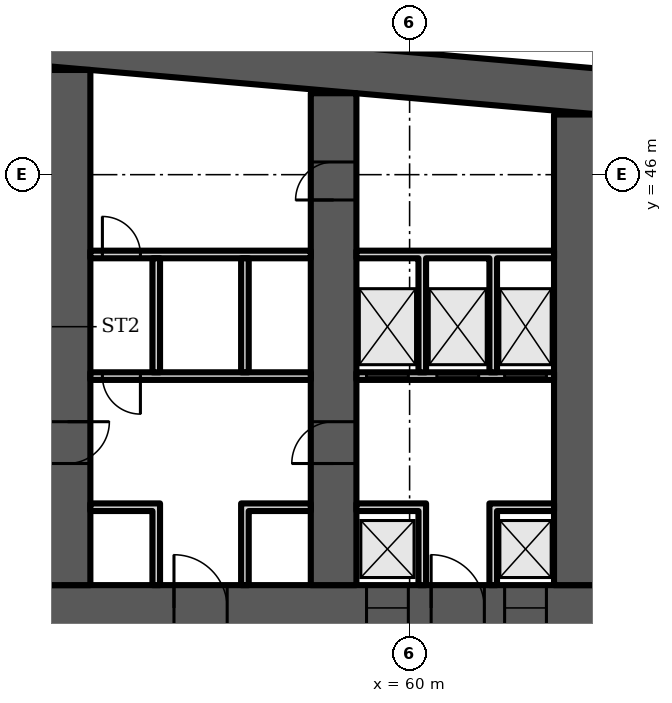
"""IFC4 building model, lengths in metres.
Left out: names, types, materials, properties, quantities, classifications, styles, units other than length and angle.
Written with IfcOpenShell. Run it as: python <this file> out.ifc"""

import sys

from ifc_helpers import new_model, si_unit, direction, frame, frame_2d, origin, place, context, subcontext, project, spatial, polyline, rectangle, outline, extrude, element, fill, save


model = new_model("IFC4")
c1 = context("Model", 3, precision=1e-05, world=origin(), true_north=direction((0.0, 1.0)))
c2 = subcontext(c1, "Body", "Model", "MODEL_VIEW")
j1 = project(units=[si_unit("LENGTHUNIT", "METRE"), si_unit("PLANEANGLEUNIT", "RADIAN")], contexts=[c1])
p1 = place(None, origin())
s1 = spatial("IfcSite", under=j1, at=p1, CompositionType="ELEMENT")
p2 = place(p1, origin())
s2 = spatial("IfcBuilding", under=s1, at=p2, CompositionType="ELEMENT")
p3 = place(p2, frame((0.0, 0.0, 84.7)))
s3 = spatial("IfcBuildingStorey", under=s2, at=p3, CompositionType="ELEMENT", Elevation=84.7)
p4 = place(p3, origin())
e1 = element("IfcWall", 1, at=p4, inside=s3, PredefinedType="SHEAR", context=c2, shape_type="SweptSolid", body=[
    extrude(outline(polyline([(9.0, 47.583), (37.0, 50.032), (65.0, 47.583), (65.0, 48.787), (37.0, 51.237), (9.0, 48.787), (9.0, 47.583)])), origin(), (0.0, 0.0, 1.0), 3.6),
])
p5 = place(p3, frame((9.0, 34.6, 0.0), z_axis=(0.0, 0.0, 1.0), x_axis=(1.0, 0.0, 0.0)))
e2 = element("IfcWall", 2, at=p5, inside=s3, PredefinedType="SHEAR", context=c2, shape_type="SweptSolid", body=[
    extrude(rectangle(XDim=56.0, YDim=1.2, at=frame_2d((28.0, 0.0))), origin(), (0.0, 0.0, 1.0), 3.6),
])
p6 = place(p5, frame((3.3, 0.0, 0.0)))
e3 = element("IfcOpeningElement", 3, at=p6, cuts=e2, PredefinedType="OPENING", context=c2, shape_type="SweptSolid", body=[
    extrude(rectangle(XDim=1.0, YDim=2.1, at=frame_2d((0.5, 1.05))), frame((0.0, 0.61, 0.0), z_axis=(0.0, -1.0, 0.0), x_axis=(1.0, 0.0, 0.0)), (0.0, 0.0, 1.0), 1.22),
])
p7 = place(p5, frame((7.867, 0.0, 0.0)))
e4 = element("IfcOpeningElement", 4, at=p7, cuts=e2, PredefinedType="OPENING", context=c2, shape_type="SweptSolid", body=[
    extrude(rectangle(XDim=1.1, YDim=2.1, at=frame_2d((0.55, 1.05))), frame((0.0, 0.61, 0.0), z_axis=(0.0, -1.0, 0.0), x_axis=(1.0, 0.0, 0.0)), (0.0, 0.0, 1.0), 1.22),
])
p8 = place(p5, frame((12.033, 0.0, 0.0)))
e5 = element("IfcOpeningElement", 5, at=p8, cuts=e2, PredefinedType="OPENING", context=c2, shape_type="SweptSolid", body=[
    extrude(rectangle(XDim=1.1, YDim=2.1, at=frame_2d((0.55, 1.05))), frame((0.0, 0.61, 0.0), z_axis=(0.0, -1.0, 0.0), x_axis=(1.0, 0.0, 0.0)), (0.0, 0.0, 1.0), 1.22),
])
p9 = place(p5, frame((9.8, 0.0, 0.0)))
e6 = element("IfcOpeningElement", 6, at=p9, cuts=e2, PredefinedType="OPENING", context=c2, shape_type="SweptSolid", body=[
    extrude(rectangle(XDim=1.4, YDim=2.1, at=frame_2d((0.7, 1.05))), frame((0.0, 0.61, 0.0), z_axis=(0.0, -1.0, 0.0), x_axis=(1.0, 0.0, 0.0)), (0.0, 0.0, 1.0), 1.22),
])
p10 = place(p5, frame((14.65, 0.0, 0.0)))
e7 = element("IfcOpeningElement", 7, at=p10, cuts=e2, PredefinedType="OPENING", context=c2, shape_type="SweptSolid", body=[
    extrude(rectangle(XDim=1.2, YDim=2.1, at=frame_2d((0.6, 1.05))), frame((0.0, 0.61, 0.0), z_axis=(0.0, -1.0, 0.0), x_axis=(1.0, 0.0, 0.0)), (0.0, 0.0, 1.0), 1.22),
])
p11 = place(p5, frame((21.867, 0.0, 0.0)))
e8 = element("IfcOpeningElement", 8, at=p11, cuts=e2, PredefinedType="OPENING", context=c2, shape_type="SweptSolid", body=[
    extrude(rectangle(XDim=1.1, YDim=2.1, at=frame_2d((0.55, 1.05))), frame((0.0, 0.61, 0.0), z_axis=(0.0, -1.0, 0.0), x_axis=(1.0, 0.0, 0.0)), (0.0, 0.0, 1.0), 1.22),
])
p12 = place(p5, frame((26.033, 0.0, 0.0)))
e9 = element("IfcOpeningElement", 9, at=p12, cuts=e2, PredefinedType="OPENING", context=c2, shape_type="SweptSolid", body=[
    extrude(rectangle(XDim=1.1, YDim=2.1, at=frame_2d((0.55, 1.05))), frame((0.0, 0.61, 0.0), z_axis=(0.0, -1.0, 0.0), x_axis=(1.0, 0.0, 0.0)), (0.0, 0.0, 1.0), 1.22),
])
p13 = place(p5, frame((23.8, 0.0, 0.0)))
e10 = element("IfcOpeningElement", 10, at=p13, cuts=e2, PredefinedType="OPENING", context=c2, shape_type="SweptSolid", body=[
    extrude(rectangle(XDim=1.4, YDim=2.1, at=frame_2d((0.7, 1.05))), frame((0.0, 0.61, 0.0), z_axis=(0.0, -1.0, 0.0), x_axis=(1.0, 0.0, 0.0)), (0.0, 0.0, 1.0), 1.22),
])
p14 = place(p5, frame((28.867, 0.0, 0.0)))
e11 = element("IfcOpeningElement", 11, at=p14, cuts=e2, PredefinedType="OPENING", context=c2, shape_type="SweptSolid", body=[
    extrude(rectangle(XDim=1.1, YDim=2.1, at=frame_2d((0.55, 1.05))), frame((0.0, 0.61, 0.0), z_axis=(0.0, -1.0, 0.0), x_axis=(1.0, 0.0, 0.0)), (0.0, 0.0, 1.0), 1.22),
])
p15 = place(p5, frame((33.033, 0.0, 0.0)))
e12 = element("IfcOpeningElement", 12, at=p15, cuts=e2, PredefinedType="OPENING", context=c2, shape_type="SweptSolid", body=[
    extrude(rectangle(XDim=1.1, YDim=2.1, at=frame_2d((0.55, 1.05))), frame((0.0, 0.61, 0.0), z_axis=(0.0, -1.0, 0.0), x_axis=(1.0, 0.0, 0.0)), (0.0, 0.0, 1.0), 1.22),
])
p16 = place(p5, frame((40.15, 0.0, 0.0)))
e13 = element("IfcOpeningElement", 13, at=p16, cuts=e2, PredefinedType="OPENING", context=c2, shape_type="SweptSolid", body=[
    extrude(rectangle(XDim=1.2, YDim=2.1, at=frame_2d((0.6, 1.05))), frame((0.0, 0.61, 0.0), z_axis=(0.0, -1.0, 0.0), x_axis=(1.0, 0.0, 0.0)), (0.0, 0.0, 1.0), 1.22),
])
p17 = place(p5, frame((44.8, 0.0, 0.0)))
e14 = element("IfcOpeningElement", 14, at=p17, cuts=e2, PredefinedType="OPENING", context=c2, shape_type="SweptSolid", body=[
    extrude(rectangle(XDim=1.4, YDim=2.1, at=frame_2d((0.7, 1.05))), frame((0.0, 0.61, 0.0), z_axis=(0.0, -1.0, 0.0), x_axis=(1.0, 0.0, 0.0)), (0.0, 0.0, 1.0), 1.22),
])
p18 = place(p5, frame((49.867, 0.0, 0.0)))
e15 = element("IfcOpeningElement", 15, at=p18, cuts=e2, PredefinedType="OPENING", context=c2, shape_type="SweptSolid", body=[
    extrude(rectangle(XDim=1.1, YDim=2.1, at=frame_2d((0.55, 1.05))), frame((0.0, 0.61, 0.0), z_axis=(0.0, -1.0, 0.0), x_axis=(1.0, 0.0, 0.0)), (0.0, 0.0, 1.0), 1.22),
])
p19 = place(p5, frame((53.5, 0.0, 0.0)))
e16 = element("IfcOpeningElement", 16, at=p19, cuts=e2, PredefinedType="OPENING", context=c2, shape_type="SweptSolid", body=[
    extrude(rectangle(XDim=1.1, YDim=2.1, at=frame_2d((0.55, 1.05))), frame((0.0, 0.61, 0.0), z_axis=(0.0, -1.0, 0.0), x_axis=(1.0, 0.0, 0.0)), (0.0, 0.0, 1.0), 1.22),
])
p20 = place(p5, frame((51.567, 0.0, 0.0)))
e17 = element("IfcOpeningElement", 17, at=p20, cuts=e2, PredefinedType="OPENING", context=c2, shape_type="SweptSolid", body=[
    extrude(rectangle(XDim=1.4, YDim=2.1, at=frame_2d((0.7, 1.05))), frame((0.0, 0.61, 0.0), z_axis=(0.0, -1.0, 0.0), x_axis=(1.0, 0.0, 0.0)), (0.0, 0.0, 1.0), 1.22),
])
p21 = place(p3, frame((51.0, 35.2, 0.0), z_axis=(0.0, 0.0, 1.0), x_axis=(0.0, 1.0, 0.0)))
e18 = element("IfcWall", 18, at=p21, inside=s3, PredefinedType="SHEAR", context=c2, shape_type="SweptSolid", body=[
    extrude(rectangle(XDim=13.555, YDim=1.2, at=frame_2d((6.778, 0.0))), origin(), (0.0, 0.0, 1.0), 3.6),
])
p22 = place(p21, frame((3.2, 0.0, 0.0)))
e19 = element("IfcOpeningElement", 19, at=p22, cuts=e18, PredefinedType="OPENING", context=c2, shape_type="SweptSolid", body=[
    extrude(rectangle(XDim=1.1, YDim=2.1, at=frame_2d((0.55, 1.05))), frame((0.0, 0.61, 0.0), z_axis=(0.0, -1.0, 0.0), x_axis=(1.0, 0.0, 0.0)), (0.0, 0.0, 1.0), 1.22),
])
p23 = place(p3, frame((58.0, 35.2, 0.0), z_axis=(0.0, 0.0, 1.0), x_axis=(0.0, 1.0, 0.0)))
e20 = element("IfcWall", 20, at=p23, inside=s3, PredefinedType="SHEAR", context=c2, shape_type="SweptSolid", body=[
    extrude(rectangle(XDim=12.943, YDim=1.2, at=frame_2d((6.471, 0.0))), origin(), (0.0, 0.0, 1.0), 3.6),
])
p24 = place(p23, frame((10.134, 0.0, 0.0)))
e21 = element("IfcOpeningElement", 21, at=p24, cuts=e20, PredefinedType="OPENING", context=c2, shape_type="SweptSolid", body=[
    extrude(rectangle(XDim=1.0, YDim=2.1, at=frame_2d((0.5, 1.05))), frame((0.0, 0.61, 0.0), z_axis=(0.0, -1.0, 0.0), x_axis=(1.0, 0.0, 0.0)), (0.0, 0.0, 1.0), 1.22),
])
p25 = place(p23, frame((3.2, 0.0, 0.0)))
e22 = element("IfcOpeningElement", 22, at=p25, cuts=e20, PredefinedType="OPENING", context=c2, shape_type="SweptSolid", body=[
    extrude(rectangle(XDim=1.1, YDim=2.1, at=frame_2d((0.55, 1.05))), frame((0.0, 0.61, 0.0), z_axis=(0.0, -1.0, 0.0), x_axis=(1.0, 0.0, 0.0)), (0.0, 0.0, 1.0), 1.22),
])
p26 = place(p3, frame((64.4, 35.2, 0.0), z_axis=(0.0, 0.0, 1.0), x_axis=(0.0, 1.0, 0.0)))
e23 = element("IfcWall", 23, at=p26, inside=s3, PredefinedType="SHEAR", context=c2, shape_type="SweptSolid", body=[
    extrude(rectangle(XDim=12.383, YDim=1.2, at=frame_2d((6.191, 0.0))), origin(), (0.0, 0.0, 1.0), 3.6),
])
p27 = place(p3, frame((51.6, 40.7, 0.0), z_axis=(0.0, 0.0, 1.0), x_axis=(1.0, 0.0, 0.0)))
e24 = element("IfcWall", 24, at=p27, inside=s3, PredefinedType="PARTITIONING", context=c2, shape_type="SweptSolid", body=[
    extrude(rectangle(XDim=5.8, YDim=0.2, at=frame_2d((2.9, 0.0))), origin(), (0.0, 0.0, 1.0), 3.2),
])
p28 = place(p27, frame((0.317, 0.0, 0.0)))
e25 = element("IfcOpeningElement", 25, at=p28, cuts=e24, PredefinedType="OPENING", context=c2, shape_type="SweptSolid", body=[
    extrude(rectangle(XDim=1.0, YDim=2.1, at=frame_2d((0.5, 1.05))), frame((0.0, 0.11, 0.0), z_axis=(0.0, -1.0, 0.0), x_axis=(1.0, 0.0, 0.0)), (0.0, 0.0, 1.0), 0.22),
])
p29 = place(p3, frame((51.6, 43.9, 0.0), z_axis=(0.0, 0.0, 1.0), x_axis=(1.0, 0.0, 0.0)))
e26 = element("IfcWall", 26, at=p29, inside=s3, PredefinedType="PARTITIONING", context=c2, shape_type="SweptSolid", body=[
    extrude(rectangle(XDim=5.8, YDim=0.2, at=frame_2d((2.9, 0.0))), origin(), (0.0, 0.0, 1.0), 3.2),
])
p30 = place(p29, frame((0.317, 0.0, 0.0)))
e27 = element("IfcOpeningElement", 27, at=p30, cuts=e26, PredefinedType="OPENING", context=c2, shape_type="SweptSolid", body=[
    extrude(rectangle(XDim=1.0, YDim=2.1, at=frame_2d((0.5, 1.05))), frame((0.0, 0.11, 0.0), z_axis=(0.0, -1.0, 0.0), x_axis=(1.0, 0.0, 0.0)), (0.0, 0.0, 1.0), 0.22),
])
p31 = place(p3, frame((0.0, 0.0, -0.0)))
e28 = element("IfcWall", 28, at=p31, inside=s3, PredefinedType="PARTITIONING", context=c2, shape_type="SweptSolid", body=[
    extrude(outline(polyline([(53.233, 37.15), (51.6, 37.15), (51.6, 37.35), (53.233, 37.35), (53.433, 37.35), (53.433, 35.2), (53.233, 35.2), (53.233, 37.15)])), origin(), (0.0, 0.0, 1.0), 3.2),
])
p32 = place(p3, frame((0.0, 0.0, -0.0)))
e29 = element("IfcWall", 29, at=p32, inside=s3, PredefinedType="PARTITIONING", context=c2, shape_type="SweptSolid", body=[
    extrude(outline(polyline([(55.567, 37.35), (55.767, 37.35), (57.4, 37.35), (57.4, 37.15), (55.767, 37.15), (55.767, 35.2), (55.567, 35.2), (55.567, 37.35)])), origin(), (0.0, 0.0, 1.0), 3.2),
])
p33 = place(p3, frame((0.0, 0.0, -0.0)))
e30 = element("IfcWall", 30, at=p33, inside=s3, PredefinedType="PARTITIONING", context=c2, shape_type="SweptSolid", body=[
    extrude(outline(polyline([(53.233, 40.8), (53.233, 43.8), (53.433, 43.8), (53.433, 40.8), (53.233, 40.8)])), origin(), (0.0, 0.0, 1.0), 3.2),
])
p34 = place(p3, frame((0.0, 0.0, -0.0)))
e31 = element("IfcWall", 31, at=p34, inside=s3, PredefinedType="PARTITIONING", context=c2, shape_type="SweptSolid", body=[
    extrude(outline(polyline([(55.567, 40.8), (55.567, 43.8), (55.767, 43.8), (55.767, 40.8), (55.567, 40.8)])), origin(), (0.0, 0.0, 1.0), 3.2),
])
p35 = place(p3, frame((58.6, 40.7, 0.0), z_axis=(0.0, 0.0, 1.0), x_axis=(1.0, 0.0, 0.0)))
e32 = element("IfcWall", 32, at=p35, inside=s3, PredefinedType="PARTITIONING", context=c2, shape_type="SweptSolid", body=[
    extrude(rectangle(XDim=5.2, YDim=0.2, at=frame_2d((2.6, 0.0))), origin(), (0.0, 0.0, 1.0), 3.2),
])
p36 = place(p35, frame((0.267, 0.0, 0.0)))
e33 = element("IfcOpeningElement", 33, at=p36, cuts=e32, PredefinedType="OPENING", context=c2, shape_type="SweptSolid", body=[
    extrude(rectangle(XDim=1.1, YDim=2.1, at=frame_2d((0.55, 1.05))), frame((0.0, 0.11, 0.0), z_axis=(0.0, -1.0, 0.0), x_axis=(1.0, 0.0, 0.0)), (0.0, 0.0, 1.0), 0.22),
])
p37 = place(p35, frame((2.117, 0.0, 0.0)))
e34 = element("IfcOpeningElement", 34, at=p37, cuts=e32, PredefinedType="OPENING", context=c2, shape_type="SweptSolid", body=[
    extrude(rectangle(XDim=1.1, YDim=2.1, at=frame_2d((0.55, 1.05))), frame((0.0, 0.11, 0.0), z_axis=(0.0, -1.0, 0.0), x_axis=(1.0, 0.0, 0.0)), (0.0, 0.0, 1.0), 0.22),
])
p38 = place(p35, frame((3.9, 0.0, 0.0)))
e35 = element("IfcOpeningElement", 35, at=p38, cuts=e32, PredefinedType="OPENING", context=c2, shape_type="SweptSolid", body=[
    extrude(rectangle(XDim=1.1, YDim=2.1, at=frame_2d((0.55, 1.05))), frame((0.0, 0.11, 0.0), z_axis=(0.0, -1.0, 0.0), x_axis=(1.0, 0.0, 0.0)), (0.0, 0.0, 1.0), 0.22),
])
p39 = place(p3, frame((0.0, 0.0, -0.0)))
e36 = element("IfcWall", 36, at=p39, inside=s3, PredefinedType="PARTITIONING", context=c2, shape_type="SweptSolid", body=[
    extrude(outline(polyline([(60.233, 37.15), (58.6, 37.15), (58.6, 37.35), (60.233, 37.35), (60.433, 37.35), (60.433, 35.2), (60.233, 35.2), (60.233, 37.15)])), origin(), (0.0, 0.0, 1.0), 3.2),
])
p40 = place(p3, frame((0.0, 0.0, -0.0)))
e37 = element("IfcWall", 37, at=p40, inside=s3, PredefinedType="PARTITIONING", context=c2, shape_type="SweptSolid", body=[
    extrude(outline(polyline([(62.1, 37.35), (62.3, 37.35), (63.8, 37.35), (63.8, 37.15), (62.3, 37.15), (62.3, 35.2), (62.1, 35.2), (62.1, 37.35)])), origin(), (0.0, 0.0, 1.0), 3.2),
])
p41 = place(p3, frame((0.0, 0.0, -0.0)))
e38 = element("IfcWall", 38, at=p41, inside=s3, PredefinedType="PARTITIONING", context=c2, shape_type="SweptSolid", body=[
    extrude(outline(polyline([(60.433, 40.8), (60.233, 40.8), (60.233, 43.8), (58.6, 43.8), (58.6, 44.0), (63.8, 44.0), (63.8, 43.8), (62.3, 43.8), (62.3, 40.8), (62.1, 40.8), (62.1, 43.8), (60.433, 43.8), (60.433, 40.8)])), origin(), (0.0, 0.0, 1.0), 3.2),
])
p42 = place(p17, origin())
e39 = element("IfcDoor", 39, at=p42, inside=s3, OperationType="DOUBLE_DOOR_SINGLE_SWING", PredefinedType="DOOR", context=c2, shape_type="SweptSolid", body=[
    extrude(rectangle(XDim=1.4, YDim=2.1, at=frame_2d((0.7, 1.05))), frame((0.0, 0.025, 0.0), z_axis=(0.0, -1.0, 0.0), x_axis=(1.0, 0.0, 0.0)), (0.0, 0.0, 1.0), 0.05),
])
fill(e14, e39)
p43 = place(p28, origin())
e40 = element("IfcDoor", 40, at=p43, inside=s3, OperationType="SINGLE_SWING_RIGHT", PredefinedType="DOOR", context=c2, shape_type="SweptSolid", body=[
    extrude(rectangle(XDim=1.0, YDim=2.1, at=frame_2d((0.5, 1.05))), frame((0.0, 0.025, 0.0), z_axis=(0.0, -1.0, 0.0), x_axis=(1.0, 0.0, 0.0)), (0.0, 0.0, 1.0), 0.05),
])
fill(e25, e40)
p44 = place(p30, origin())
e41 = element("IfcDoor", 41, at=p44, inside=s3, OperationType="SINGLE_SWING_LEFT", PredefinedType="DOOR", context=c2, shape_type="SweptSolid", body=[
    extrude(rectangle(XDim=1.0, YDim=2.1, at=frame_2d((0.5, 1.05))), frame((0.0, 0.025, 0.0), z_axis=(0.0, -1.0, 0.0), x_axis=(1.0, 0.0, 0.0)), (0.0, 0.0, 1.0), 0.05),
])
fill(e27, e41)
p45 = place(p18, origin())
e42 = element("IfcDoor", 42, at=p45, inside=s3, OperationType="DOUBLE_DOOR_SLIDING", PredefinedType="DOOR", context=c2, shape_type="SweptSolid", body=[
    extrude(rectangle(XDim=1.1, YDim=2.1, at=frame_2d((0.55, 1.05))), frame((0.0, 0.025, 0.0), z_axis=(0.0, -1.0, 0.0), x_axis=(1.0, 0.0, 0.0)), (0.0, 0.0, 1.0), 0.05),
])
fill(e15, e42)
p46 = place(p19, origin())
e43 = element("IfcDoor", 43, at=p46, inside=s3, OperationType="DOUBLE_DOOR_SLIDING", PredefinedType="DOOR", context=c2, shape_type="SweptSolid", body=[
    extrude(rectangle(XDim=1.1, YDim=2.1, at=frame_2d((0.55, 1.05))), frame((0.0, 0.025, 0.0), z_axis=(0.0, -1.0, 0.0), x_axis=(1.0, 0.0, 0.0)), (0.0, 0.0, 1.0), 0.05),
])
fill(e16, e43)
p47 = place(p20, origin())
e44 = element("IfcDoor", 44, at=p47, inside=s3, OperationType="DOUBLE_DOOR_SINGLE_SWING", PredefinedType="DOOR", context=c2, shape_type="SweptSolid", body=[
    extrude(rectangle(XDim=1.4, YDim=2.1, at=frame_2d((0.7, 1.05))), frame((0.0, 0.025, 0.0), z_axis=(0.0, -1.0, 0.0), x_axis=(1.0, 0.0, 0.0)), (0.0, 0.0, 1.0), 0.05),
])
fill(e17, e44)
p48 = place(p36, origin())
e45 = element("IfcDoor", 45, at=p48, inside=s3, OperationType="DOUBLE_DOOR_SLIDING", PredefinedType="DOOR", context=c2, shape_type="SweptSolid", body=[
    extrude(rectangle(XDim=1.1, YDim=2.1, at=frame_2d((0.55, 1.05))), frame((0.0, 0.025, 0.0), z_axis=(0.0, -1.0, 0.0), x_axis=(1.0, 0.0, 0.0)), (0.0, 0.0, 1.0), 0.05),
])
fill(e33, e45)
p49 = place(p37, origin())
e46 = element("IfcDoor", 46, at=p49, inside=s3, OperationType="DOUBLE_DOOR_SLIDING", PredefinedType="DOOR", context=c2, shape_type="SweptSolid", body=[
    extrude(rectangle(XDim=1.1, YDim=2.1, at=frame_2d((0.55, 1.05))), frame((0.0, 0.025, 0.0), z_axis=(0.0, -1.0, 0.0), x_axis=(1.0, 0.0, 0.0)), (0.0, 0.0, 1.0), 0.05),
])
fill(e34, e46)
p50 = place(p38, origin())
e47 = element("IfcDoor", 47, at=p50, inside=s3, OperationType="DOUBLE_DOOR_SLIDING", PredefinedType="DOOR", context=c2, shape_type="SweptSolid", body=[
    extrude(rectangle(XDim=1.1, YDim=2.1, at=frame_2d((0.55, 1.05))), frame((0.0, 0.025, 0.0), z_axis=(0.0, -1.0, 0.0), x_axis=(1.0, 0.0, 0.0)), (0.0, 0.0, 1.0), 0.05),
])
fill(e35, e47)
p51 = place(p24, origin())
e48 = element("IfcDoor", 48, at=p51, inside=s3, OperationType="SINGLE_SWING_LEFT", PredefinedType="DOOR", context=c2, shape_type="SweptSolid", body=[
    extrude(rectangle(XDim=1.0, YDim=2.1, at=frame_2d((0.5, 1.05))), frame((0.0, 0.6, 0.0), z_axis=(0.0, -1.0, 0.0), x_axis=(1.0, 0.0, 0.0)), (0.0, 0.0, 1.0), 1.199),
])
fill(e21, e48)
p52 = place(p22, origin())
e49 = element("IfcDoor", 49, at=p52, inside=s3, OperationType="SINGLE_SWING_RIGHT", PredefinedType="DOOR", context=c2, shape_type="SweptSolid", body=[
    extrude(rectangle(XDim=1.1, YDim=2.1, at=frame_2d((0.55, 1.05))), frame((0.0, 0.025, 0.0), z_axis=(0.0, -1.0, 0.0), x_axis=(1.0, 0.0, 0.0)), (0.0, 0.0, 1.0), 0.05),
])
fill(e19, e49)
p53 = place(p25, origin())
e50 = element("IfcDoor", 50, at=p53, inside=s3, OperationType="SINGLE_SWING_LEFT", PredefinedType="DOOR", context=c2, shape_type="SweptSolid", body=[
    extrude(rectangle(XDim=1.1, YDim=2.1, at=frame_2d((0.55, 1.05))), frame((0.0, 0.025, 0.0), z_axis=(0.0, -1.0, 0.0), x_axis=(1.0, 0.0, 0.0)), (0.0, 0.0, 1.0), 0.05),
])
fill(e22, e50)
save(model, sys.argv[1])
